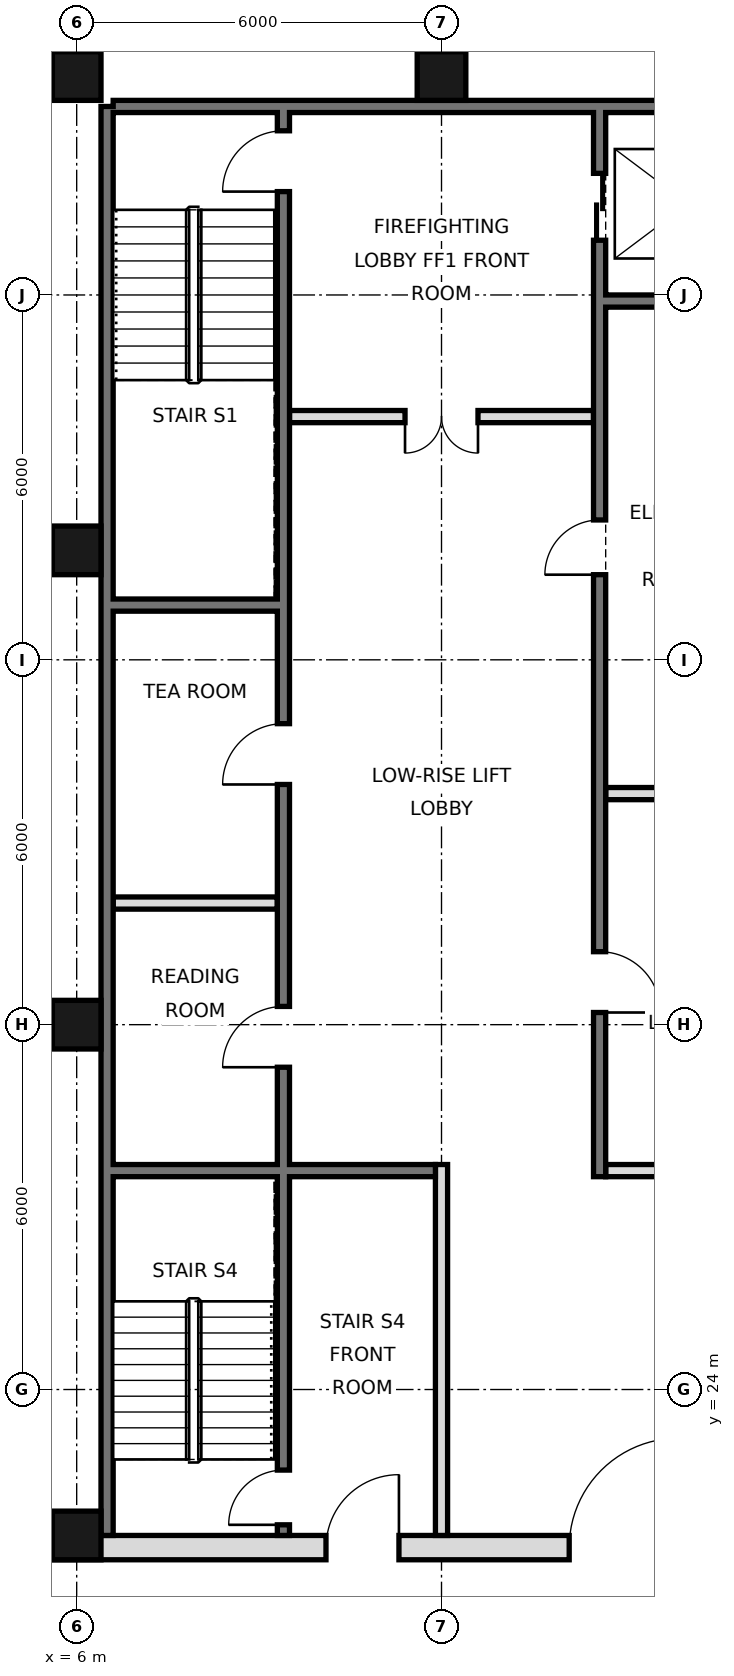
"""IFC4 building model, lengths in metres.
Left out: names, types, materials, properties, quantities, classifications, styles, units other than length and angle.
Written with IfcOpenShell. Run it as: python <this file> out.ifc"""

import sys

from ifc_helpers import new_model, si_unit, direction, frame, frame_2d, origin, origin_2d, place, context, subcontext, project, spatial, rectangle, hollow_rectangle, extrude, element, fill, save


model = new_model("IFC4")
c1 = context("Model", 3, precision=1e-05, world=origin(), true_north=direction((0.0, 1.0)))
c2 = subcontext(c1, "Body", "Model", "MODEL_VIEW")
j1 = project(units=[si_unit("LENGTHUNIT", "METRE"), si_unit("PLANEANGLEUNIT", "RADIAN")], contexts=[c1])
p1 = place(None, origin())
s1 = spatial("IfcSite", under=j1, at=p1, CompositionType="ELEMENT")
p2 = place(p1, origin())
s2 = spatial("IfcBuilding", under=s1, at=p2, CompositionType="ELEMENT")
p3 = place(p2, frame((0.0, 0.0, 222.6)))
s3 = spatial("IfcBuildingStorey", under=s2, at=p3, CompositionType="ELEMENT", Elevation=222.6)
for number, where, z_axis, x_axis in (
    (1, (6.0, 21.6, 0.0), (0.0, 0.0, 1.0), (1.0, 0.0, 0.0)),
    (2, (6.0, 30.0, 0.0), (0.0, 0.0, 1.0), (1.0, 0.0, 0.0)),
    (3, (6.0, 37.8, 0.0), (0.0, 0.0, 1.0), (1.0, 0.0, 0.0)),
    (4, (6.0, 45.6, 0.0), (0.0, 0.0, 1.0), (1.0, 0.0, 0.0)),
    (5, (12.0, 45.6, 0.0), (0.0, 0.0, 1.0), (1.0, 0.0, 0.0)),
):
    element("IfcColumn", number, at=place(p3, frame(where, z_axis=z_axis, x_axis=x_axis)), inside=s3, PredefinedType="COLUMN", context=c2, shape_type="SweptSolid", body=[
        extrude(hollow_rectangle(XDim=0.8, YDim=0.8, WallThickness=0.04, at=origin_2d()), origin(), (0.0, 0.0, 1.0), 3.6),
    ])
p4 = place(p3, frame((6.5, 21.6, 0.0), z_axis=(0.0, 0.0, 1.0), x_axis=(0.0, 1.0, 0.0)))
e6 = element("IfcWall", 6, at=p4, inside=s3, PredefinedType="SOLIDWALL", context=c2, shape_type="SweptSolid", body=[
    extrude(rectangle(XDim=23.5, YDim=0.2, at=frame_2d((11.75, 0.0))), origin(), (0.0, 0.0, 1.0), 3.42),
])
p5 = place(p3, frame((6.6, 45.1, 0.0), z_axis=(0.0, 0.0, 1.0), x_axis=(1.0, 0.0, 0.0)))
e7 = element("IfcWall", 7, at=p5, inside=s3, PredefinedType="SOLIDWALL", context=c2, shape_type="SweptSolid", body=[
    extrude(rectangle(XDim=34.8, YDim=0.2, at=frame_2d((17.4, 0.0))), origin(), (0.0, 0.0, 1.0), 3.42),
])
p6 = place(p3, frame((5.6, 21.4, 0.0), z_axis=(0.0, 0.0, 1.0), x_axis=(1.0, 0.0, 0.0)))
e8 = element("IfcWall", 8, at=p6, inside=s3, PredefinedType="SOLIDWALL", context=c2, shape_type="SweptSolid", body=[
    extrude(rectangle(XDim=36.8, YDim=0.4, at=frame_2d((18.4, 0.0))), origin(), (0.0, 0.0, 1.0), 3.42),
])
p7 = place(p6, frame((8.5, 0.0, 0.0)))
e9 = element("IfcOpeningElement", 9, at=p7, cuts=e8, PredefinedType="OPENING", context=c2, shape_type="SweptSolid", body=[
    extrude(rectangle(XDim=1.8, YDim=2.1, at=frame_2d((0.9, 1.05))), frame((0.0, 0.21, 0.0), z_axis=(0.0, -1.0, 0.0), x_axis=(1.0, 0.0, 0.0)), (0.0, 0.0, 1.0), 0.42),
])
p8 = place(p6, frame((17.5, 0.0, 0.0)))
e10 = element("IfcOpeningElement", 10, at=p8, cuts=e8, PredefinedType="OPENING", context=c2, shape_type="SweptSolid", body=[
    extrude(rectangle(XDim=1.8, YDim=2.1, at=frame_2d((0.9, 1.05))), frame((0.0, 0.21, 0.0), z_axis=(0.0, -1.0, 0.0), x_axis=(1.0, 0.0, 0.0)), (0.0, 0.0, 1.0), 0.42),
])
p9 = place(p6, frame((26.5, 0.0, 0.0)))
e11 = element("IfcOpeningElement", 11, at=p9, cuts=e8, PredefinedType="OPENING", context=c2, shape_type="SweptSolid", body=[
    extrude(rectangle(XDim=1.8, YDim=2.1, at=frame_2d((0.9, 1.05))), frame((0.0, 0.21, 0.0), z_axis=(0.0, -1.0, 0.0), x_axis=(1.0, 0.0, 0.0)), (0.0, 0.0, 1.0), 0.42),
])
p10 = place(p6, frame((4.5, 0.0, 0.0)))
e12 = element("IfcOpeningElement", 12, at=p10, cuts=e8, PredefinedType="OPENING", context=c2, shape_type="SweptSolid", body=[
    extrude(rectangle(XDim=1.2, YDim=2.1, at=frame_2d((0.6, 1.05))), frame((0.0, 0.21, 0.0), z_axis=(0.0, -1.0, 0.0), x_axis=(1.0, 0.0, 0.0)), (0.0, 0.0, 1.0), 0.42),
])
p11 = place(p6, frame((31.1, 0.0, 0.0)))
e13 = element("IfcOpeningElement", 13, at=p11, cuts=e8, PredefinedType="OPENING", context=c2, shape_type="SweptSolid", body=[
    extrude(rectangle(XDim=1.2, YDim=2.1, at=frame_2d((0.6, 1.05))), frame((0.0, 0.21, 0.0), z_axis=(0.0, -1.0, 0.0), x_axis=(1.0, 0.0, 0.0)), (0.0, 0.0, 1.0), 0.42),
])
p12 = place(p3, frame((12.0, 21.6, 0.0), z_axis=(0.0, 0.0, 1.0), x_axis=(0.0, 1.0, 0.0)))
e14 = element("IfcWall", 14, at=p12, inside=s3, PredefinedType="PARTITIONING", context=c2, shape_type="SweptSolid", body=[
    extrude(rectangle(XDim=6.1, YDim=0.2, at=frame_2d((3.05, 0.0))), origin(), (0.0, 0.0, 1.0), 3.42),
])
p13 = place(p3, frame((14.6, 27.5, 0.0), z_axis=(0.0, 0.0, 1.0), x_axis=(0.0, 1.0, 0.0)))
e15 = element("IfcWall", 15, at=p13, inside=s3, PredefinedType="SOLIDWALL", context=c2, shape_type="SweptSolid", body=[
    extrude(rectangle(XDim=17.5, YDim=0.2, at=frame_2d((8.75, 0.0))), origin(), (0.0, 0.0, 1.0), 3.42),
])
p14 = place(p13, frame((15.4, 0.0, 0.0)))
e16 = element("IfcOpeningElement", 16, at=p14, cuts=e15, PredefinedType="OPENING", context=c2, shape_type="SweptSolid", body=[
    extrude(rectangle(XDim=1.1, YDim=2.1, at=frame_2d((0.55, 1.05))), frame((0.0, 0.11, 0.0), z_axis=(0.0, -1.0, 0.0), x_axis=(1.0, 0.0, 0.0)), (0.0, 0.0, 1.0), 0.22),
])
p15 = place(p13, frame((2.7, 0.0, 0.0)))
e17 = element("IfcOpeningElement", 17, at=p15, cuts=e15, PredefinedType="OPENING", context=c2, shape_type="SweptSolid", body=[
    extrude(rectangle(XDim=1.0, YDim=2.1, at=frame_2d((0.5, 1.05))), frame((0.0, 0.11, 0.0), z_axis=(0.0, -1.0, 0.0), x_axis=(1.0, 0.0, 0.0)), (0.0, 0.0, 1.0), 0.22),
])
p16 = place(p13, frame((9.9, 0.0, 0.0)))
e18 = element("IfcOpeningElement", 18, at=p16, cuts=e15, PredefinedType="OPENING", context=c2, shape_type="SweptSolid", body=[
    extrude(rectangle(XDim=0.9, YDim=2.1, at=frame_2d((0.45, 1.05))), frame((0.0, 0.11, 0.0), z_axis=(0.0, -1.0, 0.0), x_axis=(1.0, 0.0, 0.0)), (0.0, 0.0, 1.0), 0.22),
])
p17 = place(p3, frame((9.4, 21.6, 0.0), z_axis=(0.0, 0.0, 1.0), x_axis=(0.0, 1.0, 0.0)))
e19 = element("IfcWall", 19, at=p17, inside=s3, PredefinedType="SOLIDWALL", context=c2, shape_type="SweptSolid", body=[
    extrude(rectangle(XDim=23.4, YDim=0.2, at=frame_2d((11.7, 0.0))), origin(), (0.0, 0.0, 1.0), 3.42),
])
p18 = place(p17, frame((7.7, 0.0, 0.0)))
e20 = element("IfcOpeningElement", 20, at=p18, cuts=e19, PredefinedType="OPENING", context=c2, shape_type="SweptSolid", body=[
    extrude(rectangle(XDim=1.0, YDim=2.1, at=frame_2d((0.5, 1.05))), frame((0.0, 0.11, 0.0), z_axis=(0.0, -1.0, 0.0), x_axis=(1.0, 0.0, 0.0)), (0.0, 0.0, 1.0), 0.22),
])
p19 = place(p17, frame((12.35, 0.0, 0.0)))
e21 = element("IfcOpeningElement", 21, at=p19, cuts=e19, PredefinedType="OPENING", context=c2, shape_type="SweptSolid", body=[
    extrude(rectangle(XDim=1.0, YDim=2.1, at=frame_2d((0.5, 1.05))), frame((0.0, 0.11, 0.0), z_axis=(0.0, -1.0, 0.0), x_axis=(1.0, 0.0, 0.0)), (0.0, 0.0, 1.0), 0.22),
])
p20 = place(p17, frame((22.1, 0.0, 0.0)))
e22 = element("IfcOpeningElement", 22, at=p20, cuts=e19, PredefinedType="OPENING", context=c2, shape_type="SweptSolid", body=[
    extrude(rectangle(XDim=1.0, YDim=2.1, at=frame_2d((0.5, 1.05))), frame((0.0, 0.11, 0.0), z_axis=(0.0, -1.0, 0.0), x_axis=(1.0, 0.0, 0.0)), (0.0, 0.0, 1.0), 0.22),
])
p21 = place(p17, frame((0.175, 0.0, 0.0)))
e23 = element("IfcOpeningElement", 23, at=p21, cuts=e19, PredefinedType="OPENING", context=c2, shape_type="SweptSolid", body=[
    extrude(rectangle(XDim=0.9, YDim=2.1, at=frame_2d((0.45, 1.05))), frame((0.0, 0.11, 0.0), z_axis=(0.0, -1.0, 0.0), x_axis=(1.0, 0.0, 0.0)), (0.0, 0.0, 1.0), 0.22),
])
p22 = place(p3, frame((14.7, 27.6, 0.0), z_axis=(0.0, 0.0, 1.0), x_axis=(1.0, 0.0, 0.0)))
e24 = element("IfcWall", 24, at=p22, inside=s3, PredefinedType="PARTITIONING", context=c2, shape_type="SweptSolid", body=[
    extrude(rectangle(XDim=2.7, YDim=0.2, at=frame_2d((1.35, 0.0))), origin(), (0.0, 0.0, 1.0), 3.42),
])
p23 = place(p3, frame((6.6, 27.6, 0.0), z_axis=(0.0, 0.0, 1.0), x_axis=(1.0, 0.0, 0.0)))
e25 = element("IfcWall", 25, at=p23, inside=s3, PredefinedType="SOLIDWALL", context=c2, shape_type="SweptSolid", body=[
    extrude(rectangle(XDim=5.3, YDim=0.2, at=frame_2d((2.65, 0.0))), origin(), (0.0, 0.0, 1.0), 3.42),
])
p24 = place(p3, frame((6.6, 32.0, 0.0), z_axis=(0.0, 0.0, 1.0), x_axis=(1.0, 0.0, 0.0)))
e26 = element("IfcWall", 26, at=p24, inside=s3, PredefinedType="PARTITIONING", context=c2, shape_type="SweptSolid", body=[
    extrude(rectangle(XDim=2.7, YDim=0.2, at=frame_2d((1.35, 0.0))), origin(), (0.0, 0.0, 1.0), 3.42),
])
for number, where, z_axis, x_axis in (
    (27, (14.7, 33.8, 0.0), (0.0, 0.0, 1.0), (1.0, 0.0, 0.0)),
    (28, (6.6, 36.9, 0.0), (0.0, 0.0, 1.0), (1.0, 0.0, 0.0)),
):
    element("IfcWall", number, at=place(p3, frame(where, z_axis=z_axis, x_axis=x_axis)), inside=s3, PredefinedType="SOLIDWALL", context=c2, shape_type="SweptSolid", body=[
        extrude(rectangle(XDim=2.7, YDim=0.2, at=frame_2d((1.35, 0.0))), origin(), (0.0, 0.0, 1.0), 3.42),
    ])
p25 = place(p3, frame((9.5, 40.0, 0.0), z_axis=(0.0, 0.0, 1.0), x_axis=(1.0, 0.0, 0.0)))
e29 = element("IfcWall", 29, at=p25, inside=s3, PredefinedType="PARTITIONING", context=c2, shape_type="SweptSolid", body=[
    extrude(rectangle(XDim=5.0, YDim=0.2, at=frame_2d((2.5, 0.0))), origin(), (0.0, 0.0, 1.0), 3.42),
])
p26 = place(p25, frame((1.9, 0.0, 0.0)))
e30 = element("IfcOpeningElement", 30, at=p26, cuts=e29, PredefinedType="OPENING", context=c2, shape_type="SweptSolid", body=[
    extrude(rectangle(XDim=1.2, YDim=2.1, at=frame_2d((0.6, 1.05))), frame((0.0, 0.11, 0.0), z_axis=(0.0, -1.0, 0.0), x_axis=(1.0, 0.0, 0.0)), (0.0, 0.0, 1.0), 0.22),
])
p27 = place(p3, frame((14.7, 41.9, 0.0), z_axis=(0.0, 0.0, 1.0), x_axis=(1.0, 0.0, 0.0)))
e31 = element("IfcWall", 31, at=p27, inside=s3, PredefinedType="SOLIDWALL", context=c2, shape_type="SweptSolid", body=[
    extrude(rectangle(XDim=2.7, YDim=0.2, at=frame_2d((1.35, 0.0))), origin(), (0.0, 0.0, 1.0), 3.42),
])
p28 = place(p7, frame((1.8, 0.0, 0.0), z_axis=(0.0, 0.0, 1.0), x_axis=(-1.0, 0.0, 0.0)))
e32 = element("IfcDoor", 32, at=p28, inside=s3, OperationType="SINGLE_SWING_LEFT", PredefinedType="DOOR", context=c2, shape_type="SweptSolid", body=[
    extrude(rectangle(XDim=1.8, YDim=2.1, at=frame_2d((0.9, 1.05))), frame((0.0, 0.025, 0.0), z_axis=(0.0, -1.0, 0.0), x_axis=(1.0, 0.0, 0.0)), (0.0, 0.0, 1.0), 0.05),
])
fill(e9, e32)
p29 = place(p10, frame((1.2, 0.0, 0.0), z_axis=(0.0, 0.0, 1.0), x_axis=(-1.0, 0.0, 0.0)))
e33 = element("IfcDoor", 33, at=p29, inside=s3, OperationType="SINGLE_SWING_LEFT", PredefinedType="DOOR", context=c2, shape_type="SweptSolid", body=[
    extrude(rectangle(XDim=1.2, YDim=2.1, at=frame_2d((0.6, 1.05))), frame((0.0, 0.025, 0.0), z_axis=(0.0, -1.0, 0.0), x_axis=(1.0, 0.0, 0.0)), (0.0, 0.0, 1.0), 0.05),
])
fill(e12, e33)
p30 = place(p26, frame((1.2, 0.0, 0.0), z_axis=(0.0, 0.0, 1.0), x_axis=(-1.0, 0.0, 0.0)))
e34 = element("IfcDoor", 34, at=p30, inside=s3, OperationType="DOUBLE_DOOR_SINGLE_SWING", PredefinedType="DOOR", context=c2, shape_type="SweptSolid", body=[
    extrude(rectangle(XDim=1.2, YDim=2.1, at=frame_2d((0.6, 1.05))), frame((0.0, 0.025, 0.0), z_axis=(0.0, -1.0, 0.0), x_axis=(1.0, 0.0, 0.0)), (0.0, 0.0, 1.0), 0.05),
])
fill(e30, e34)
p31 = place(p14, origin())
e35 = element("IfcDoor", 35, at=p31, inside=s3, OperationType="DOUBLE_DOOR_SLIDING", PredefinedType="DOOR", context=c2, shape_type="SweptSolid", body=[
    extrude(rectangle(XDim=1.1, YDim=2.1, at=frame_2d((0.55, 1.05))), frame((0.0, 0.025, 0.0), z_axis=(0.0, -1.0, 0.0), x_axis=(1.0, 0.0, 0.0)), (0.0, 0.0, 1.0), 0.05),
])
fill(e16, e35)
p32 = place(p15, frame((1.0, 0.0, 0.0), z_axis=(0.0, 0.0, 1.0), x_axis=(-1.0, 0.0, 0.0)))
e36 = element("IfcDoor", 36, at=p32, inside=s3, OperationType="SINGLE_SWING_RIGHT", PredefinedType="DOOR", context=c2, shape_type="SweptSolid", body=[
    extrude(rectangle(XDim=1.0, YDim=2.1, at=frame_2d((0.5, 1.05))), frame((0.0, 0.025, 0.0), z_axis=(0.0, -1.0, 0.0), x_axis=(1.0, 0.0, 0.0)), (0.0, 0.0, 1.0), 0.05),
])
fill(e17, e36)
p33 = place(p18, origin())
e37 = element("IfcDoor", 37, at=p33, inside=s3, OperationType="SINGLE_SWING_LEFT", PredefinedType="DOOR", context=c2, shape_type="SweptSolid", body=[
    extrude(rectangle(XDim=1.0, YDim=2.1, at=frame_2d((0.5, 1.05))), frame((0.0, 0.025, 0.0), z_axis=(0.0, -1.0, 0.0), x_axis=(1.0, 0.0, 0.0)), (0.0, 0.0, 1.0), 0.05),
])
fill(e20, e37)
p34 = place(p19, origin())
e38 = element("IfcDoor", 38, at=p34, inside=s3, OperationType="SINGLE_SWING_LEFT", PredefinedType="DOOR", context=c2, shape_type="SweptSolid", body=[
    extrude(rectangle(XDim=1.0, YDim=2.1, at=frame_2d((0.5, 1.05))), frame((0.0, 0.025, 0.0), z_axis=(0.0, -1.0, 0.0), x_axis=(1.0, 0.0, 0.0)), (0.0, 0.0, 1.0), 0.05),
])
fill(e21, e38)
p35 = place(p20, origin())
e39 = element("IfcDoor", 39, at=p35, inside=s3, OperationType="SINGLE_SWING_LEFT", PredefinedType="DOOR", context=c2, shape_type="SweptSolid", body=[
    extrude(rectangle(XDim=1.0, YDim=2.1, at=frame_2d((0.5, 1.05))), frame((0.0, 0.025, 0.0), z_axis=(0.0, -1.0, 0.0), x_axis=(1.0, 0.0, 0.0)), (0.0, 0.0, 1.0), 0.05),
])
fill(e22, e39)
p36 = place(p21, origin())
e40 = element("IfcDoor", 40, at=p36, inside=s3, OperationType="SINGLE_SWING_LEFT", PredefinedType="DOOR", context=c2, shape_type="SweptSolid", body=[
    extrude(rectangle(XDim=0.9, YDim=2.1, at=frame_2d((0.45, 1.05))), frame((0.0, 0.025, 0.0), z_axis=(0.0, -1.0, 0.0), x_axis=(1.0, 0.0, 0.0)), (0.0, 0.0, 1.0), 0.05),
])
fill(e23, e40)
p37 = place(p16, origin())
e41 = element("IfcDoor", 41, at=p37, inside=s3, OperationType="SINGLE_SWING_LEFT", PredefinedType="DOOR", context=c2, shape_type="SweptSolid", body=[
    extrude(rectangle(XDim=0.9, YDim=2.1, at=frame_2d((0.45, 1.05))), frame((0.0, 0.025, 0.0), z_axis=(0.0, -1.0, 0.0), x_axis=(1.0, 0.0, 0.0)), (0.0, 0.0, 1.0), 0.05),
])
fill(e18, e41)
save(model, sys.argv[1])
